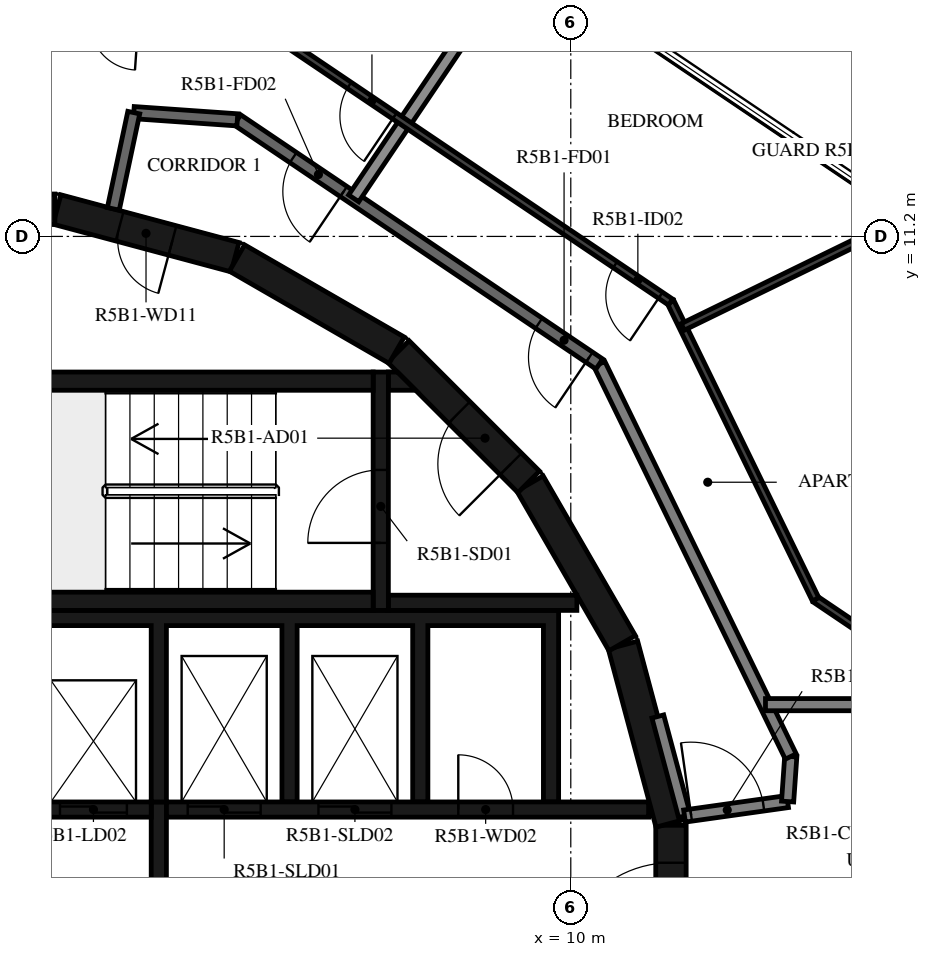
"""IFC4 building model, lengths in metres.
Left out: names, types, materials, properties, quantities, classifications, styles, units other than length and angle.
Written with IfcOpenShell. Run it as: python <this file> out.ifc"""

import sys

from ifc_helpers import new_model, si_unit, direction, frame, frame_2d, origin, place, context, subcontext, project, spatial, polyline, rectangle, outline, extrude, element, fill, save


model = new_model("IFC4")
c1 = context("Model", 3, precision=1e-05, world=origin(), true_north=direction((0.0, 1.0)))
c2 = subcontext(c1, "Body", "Model", "MODEL_VIEW")
j1 = project(units=[si_unit("LENGTHUNIT", "METRE"), si_unit("PLANEANGLEUNIT", "RADIAN")], contexts=[c1])
p1 = place(None, origin())
s1 = spatial("IfcSite", under=j1, at=p1, CompositionType="ELEMENT")
p2 = place(p1, origin())
s2 = spatial("IfcBuilding", under=s1, at=p2, CompositionType="ELEMENT")
p3 = place(p2, frame((0.0, 0.0, 198.9)))
s3 = spatial("IfcBuildingStorey", under=s2, at=p3, CompositionType="ELEMENT", Elevation=198.9)
p4 = place(p3, frame((11.647, -1.516, 0.0), z_axis=(0.0, 0.0, 1.0), x_axis=(0.0, 1.0, 0.0)))
e1 = element("IfcWall", 1, at=p4, inside=s3, PredefinedType="SHEAR", context=c2, shape_type="SweptSolid", body=[
    extrude(rectangle(XDim=3.033, YDim=0.5, at=frame_2d((1.516, 0.0))), origin(), (0.0, 0.0, 1.0), 3.12),
])
p5 = place(p4, frame((0.616, 0.0, 0.0)))
e2 = element("IfcOpeningElement", 2, at=p5, cuts=e1, PredefinedType="OPENING", context=c2, shape_type="SweptSolid", body=[
    extrude(rectangle(XDim=1.8, YDim=2.1, at=frame_2d((0.9, 1.05))), frame((0.0, 0.26, 0.0), z_axis=(0.0, -1.0, 0.0), x_axis=(1.0, 0.0, 0.0)), (0.0, 0.0, 1.0), 0.52),
])
for number, where, z_axis, x_axis in (
    (3, (11.643, 1.55, 0.0), (0.0, 0.0, 1.0), (-0.259, 0.966, 0.0)),
    (4, (10.845, 4.51, 0.0), (0.0, 0.0, 1.0), (-0.5, 0.866, 0.0)),
):
    element("IfcWall", number, at=place(p3, frame(where, z_axis=z_axis, x_axis=x_axis)), inside=s3, PredefinedType="SHEAR", context=c2, shape_type="SweptSolid", body=[
        extrude(rectangle(XDim=3.033, YDim=0.5, at=frame_2d((1.516, 0.0))), origin(), (0.0, 0.0, 1.0), 3.12),
    ])
p6 = place(p3, frame((9.308, 7.164, 0.0), z_axis=(0.0, 0.0, 1.0), x_axis=(-0.707106781187, 0.707106781187, 0.0)))
e5 = element("IfcWall", 5, at=p6, inside=s3, PredefinedType="SHEAR", context=c2, shape_type="SweptSolid", body=[
    extrude(rectangle(XDim=3.032, YDim=0.5, at=frame_2d((1.516, 0.0))), origin(), (0.0, 0.0, 1.0), 3.12),
])
p7 = place(p6, frame((0.416, 0.0, 0.0)))
e6 = element("IfcOpeningElement", 6, at=p7, cuts=e5, PredefinedType="OPENING", context=c2, shape_type="SweptSolid", body=[
    extrude(rectangle(XDim=1.2, YDim=2.1, at=frame_2d((0.6, 1.05))), frame((0.0, 0.26, 0.0), z_axis=(0.0, -1.0, 0.0), x_axis=(1.0, 0.0, 0.0)), (0.0, 0.0, 1.0), 0.52),
])
p8 = place(p3, frame((7.137, 9.329, 0.0), z_axis=(0.0, 0.0, 1.0), x_axis=(-0.865975092491, 0.500087131594, 0.0)))
e7 = element("IfcWall", 7, at=p8, inside=s3, PredefinedType="SHEAR", context=c2, shape_type="SweptSolid", body=[
    extrude(rectangle(XDim=3.033, YDim=0.5, at=frame_2d((1.516, 0.0))), origin(), (0.0, 0.0, 1.0), 3.12),
])
p9 = place(p3, frame((4.479, 10.858, 0.0), z_axis=(0.0, 0.0, 1.0), x_axis=(-0.965948410781, 0.258734743916, 0.0)))
e8 = element("IfcWall", 8, at=p9, inside=s3, PredefinedType="SHEAR", context=c2, shape_type="SweptSolid", body=[
    extrude(rectangle(XDim=3.033, YDim=0.5, at=frame_2d((1.516, 0.0))), origin(), (0.0, 0.0, 1.0), 3.12),
])
p10 = place(p9, frame((1.066, 0.0, 0.0)))
e9 = element("IfcOpeningElement", 9, at=p10, cuts=e8, PredefinedType="OPENING", context=c2, shape_type="SweptSolid", body=[
    extrude(rectangle(XDim=0.9, YDim=2.1, at=frame_2d((0.45, 1.05))), frame((0.0, 0.26, 0.0), z_axis=(0.0, -1.0, 0.0), x_axis=(1.0, 0.0, 0.0)), (0.0, 0.0, 1.0), 0.52),
])
p11 = place(p3, frame((1.516, 11.647, 0.0), z_axis=(0.0, 0.0, 1.0), x_axis=(-1.0, 0.0, 0.0)))
e10 = element("IfcWall", 10, at=p11, inside=s3, PredefinedType="SHEAR", context=c2, shape_type="SweptSolid", body=[
    extrude(rectangle(XDim=3.033, YDim=0.5, at=frame_2d((1.516, 0.0))), origin(), (0.0, 0.0, 1.0), 3.12),
])
for number, where, z_axis, x_axis in (
    (11, (0.0, 5.2, 0.0), (0.0, 0.0, 1.0), (1.0, 0.0, 0.0)),
    (12, (0.0, 8.82, 0.0), (0.0, 0.0, 1.0), (1.0, 0.0, 0.0)),
):
    element("IfcWall", number, at=place(p3, frame(where, z_axis=z_axis, x_axis=x_axis)), inside=s3, PredefinedType="SHEAR", context=c2, shape_type="SweptSolid", body=[
        extrude(rectangle(XDim=6.75, YDim=0.3, at=frame_2d((3.375, 0.0))), origin(), (0.0, 0.0, 1.0), 3.12),
    ])
p12 = place(p3, frame((6.875, 5.05, 0.0), z_axis=(0.0, 0.0, 1.0), x_axis=(0.0, 1.0, 0.0)))
e13 = element("IfcWall", 13, at=p12, inside=s3, PredefinedType="SHEAR", context=c2, shape_type="SweptSolid", body=[
    extrude(rectangle(XDim=3.92, YDim=0.25, at=frame_2d((1.96, 0.0))), origin(), (0.0, 0.0, 1.0), 3.12),
])
p13 = place(p12, frame((1.11, 0.0, 0.0)))
e14 = element("IfcOpeningElement", 14, at=p13, cuts=e13, PredefinedType="OPENING", context=c2, shape_type="SweptSolid", body=[
    extrude(rectangle(XDim=1.2, YDim=2.1, at=frame_2d((0.6, 1.05))), frame((0.0, 0.135, 0.0), z_axis=(0.0, -1.0, 0.0), x_axis=(1.0, 0.0, 0.0)), (0.0, 0.0, 1.0), 0.27),
])
p14 = place(p3, frame((7.0, 5.175, 0.0), z_axis=(0.0, 0.0, 1.0), x_axis=(1.0, 0.0, 0.0)))
e15 = element("IfcWall", 15, at=p14, inside=s3, PredefinedType="SHEAR", context=c2, shape_type="SweptSolid", body=[
    extrude(rectangle(XDim=3.1, YDim=0.25, at=frame_2d((1.55, 0.0))), origin(), (0.0, 0.0, 1.0), 3.12),
])
p15 = place(p3, origin())
e16 = element("IfcWall", 16, at=p15, inside=s3, PredefinedType="SHEAR", context=c2, shape_type="SweptSolid", body=[
    extrude(outline(polyline([(7.448, 8.67), (7.0, 8.67), (7.0, 8.97), (7.148, 8.97), (7.448, 8.67)])), origin(), (0.0, 0.0, 1.0), 3.12),
])
p16 = place(p3, origin())
e17 = element("IfcWall", 17, at=p16, inside=s3, PredefinedType="SHEAR", context=c2, shape_type="SweptSolid", body=[
    extrude(outline(polyline([(-9.55, 4.8), (-1.2, 4.8), (-1.2, 1.9), (-0.95, 1.9), (-0.95, 4.8), (0.95, 4.8), (0.95, 1.9), (1.2, 1.9), (1.2, 4.8), (3.1, 4.8), (3.1, 1.9), (3.35, 1.9), (3.35, 4.8), (5.25, 4.8), (5.25, 1.9), (5.5, 1.9), (5.5, 4.8), (7.4, 4.8), (7.4, 1.9), (7.65, 1.9), (7.65, 4.8), (9.55, 4.8), (9.55, 1.9), (9.8, 1.9), (9.8, 4.8), (9.8, 5.05), (-9.8, 5.05), (-9.8, 4.8), (-9.8, 1.9), (-9.55, 1.9), (-9.55, 4.8)])), origin(), (0.0, 0.0, 1.0), 3.12),
])
p17 = place(p3, frame((-11.28, 1.775, 0.0), z_axis=(0.0, 0.0, 1.0), x_axis=(1.0, 0.0, 0.0)))
e18 = element("IfcWall", 18, at=p17, inside=s3, PredefinedType="SHEAR", context=c2, shape_type="SweptSolid", body=[
    extrude(rectangle(XDim=14.38, YDim=0.25, at=frame_2d((7.19, 0.0))), origin(), (0.0, 0.0, 1.0), 3.12),
])
p18 = place(p17, frame((10.73, 0.0, 0.0)))
e19 = element("IfcOpeningElement", 19, at=p18, cuts=e18, PredefinedType="OPENING", context=c2, shape_type="SweptSolid", body=[
    extrude(rectangle(XDim=1.1, YDim=2.1, at=frame_2d((0.55, 1.05))), frame((0.0, 0.135, 0.0), z_axis=(0.0, -1.0, 0.0), x_axis=(1.0, 0.0, 0.0)), (0.0, 0.0, 1.0), 0.27),
])
p19 = place(p17, frame((12.88, 0.0, 0.0)))
e20 = element("IfcOpeningElement", 20, at=p19, cuts=e18, PredefinedType="OPENING", context=c2, shape_type="SweptSolid", body=[
    extrude(rectangle(XDim=1.1, YDim=2.1, at=frame_2d((0.55, 1.05))), frame((0.0, 0.135, 0.0), z_axis=(0.0, -1.0, 0.0), x_axis=(1.0, 0.0, 0.0)), (0.0, 0.0, 1.0), 0.27),
])
p20 = place(p17, frame((5.455, 0.0, 0.0)))
e21 = element("IfcOpeningElement", 21, at=p20, cuts=e18, PredefinedType="OPENING", context=c2, shape_type="SweptSolid", body=[
    extrude(rectangle(XDim=0.9, YDim=2.1, at=frame_2d((0.45, 1.05))), frame((0.0, 0.135, 0.0), z_axis=(0.0, -1.0, 0.0), x_axis=(1.0, 0.0, 0.0)), (0.0, 0.0, 1.0), 0.27),
])
p21 = place(p3, frame((3.35, 1.775, 0.0), z_axis=(0.0, 0.0, 1.0), x_axis=(1.0, 0.0, 0.0)))
e22 = element("IfcWall", 22, at=p21, inside=s3, PredefinedType="SHEAR", context=c2, shape_type="SweptSolid", body=[
    extrude(rectangle(XDim=7.93, YDim=0.25, at=frame_2d((3.965, 0.0))), origin(), (0.0, 0.0, 1.0), 3.12),
])
p22 = place(p21, frame((0.35, 0.0, 0.0)))
e23 = element("IfcOpeningElement", 23, at=p22, cuts=e22, PredefinedType="OPENING", context=c2, shape_type="SweptSolid", body=[
    extrude(rectangle(XDim=1.2, YDim=2.4, at=frame_2d((0.6, 1.2))), frame((0.0, 0.135, 0.0), z_axis=(0.0, -1.0, 0.0), x_axis=(1.0, 0.0, 0.0)), (0.0, 0.0, 1.0), 0.27),
])
p23 = place(p21, frame((2.5, 0.0, 0.0)))
e24 = element("IfcOpeningElement", 24, at=p23, cuts=e22, PredefinedType="OPENING", context=c2, shape_type="SweptSolid", body=[
    extrude(rectangle(XDim=1.2, YDim=2.4, at=frame_2d((0.6, 1.2))), frame((0.0, 0.135, 0.0), z_axis=(0.0, -1.0, 0.0), x_axis=(1.0, 0.0, 0.0)), (0.0, 0.0, 1.0), 0.27),
])
p24 = place(p21, frame((4.8, 0.0, 0.0)))
e25 = element("IfcOpeningElement", 25, at=p24, cuts=e22, PredefinedType="OPENING", context=c2, shape_type="SweptSolid", body=[
    extrude(rectangle(XDim=0.9, YDim=2.1, at=frame_2d((0.45, 1.05))), frame((0.0, 0.135, 0.0), z_axis=(0.0, -1.0, 0.0), x_axis=(1.0, 0.0, 0.0)), (0.0, 0.0, 1.0), 0.27),
])
p25 = place(p3, frame((3.225, -1.9, 0.0), z_axis=(0.0, 0.0, 1.0), x_axis=(0.0, 1.0, 0.0)))
e26 = element("IfcWall", 26, at=p25, inside=s3, PredefinedType="SHEAR", context=c2, shape_type="SweptSolid", body=[
    extrude(rectangle(XDim=3.8, YDim=0.25, at=frame_2d((1.9, 0.0))), origin(), (0.0, 0.0, 1.0), 3.12),
])
p26 = place(p3, frame((11.87, 1.668, 0.0), z_axis=(0.0, 0.0, 1.0), x_axis=(-0.258836880648, 0.965921047093, 0.0)))
e27 = element("IfcWall", 27, at=p26, inside=s3, PredefinedType="STANDARD", context=c2, shape_type="SweptSolid", body=[
    extrude(rectangle(XDim=1.695, YDim=0.2, at=frame_2d((0.848, 0.0))), origin(), (0.0, 0.0, 1.0), 3.12),
])
p27 = place(p3, frame((11.87, 1.668, 0.0), z_axis=(0.0, 0.0, 1.0), x_axis=(0.990271931984, 0.139145609792, 0.0)))
e28 = element("IfcWall", 28, at=p27, inside=s3, PredefinedType="STANDARD", context=c2, shape_type="SweptSolid", body=[
    extrude(rectangle(XDim=1.712, YDim=0.2, at=frame_2d((0.856, 0.0))), origin(), (0.0, 0.0, 1.0), 3.12),
])
p28 = place(p27, frame((0.11, 0.0, 0.0)))
e29 = element("IfcOpeningElement", 29, at=p28, cuts=e28, PredefinedType="OPENING", context=c2, shape_type="SweptSolid", body=[
    extrude(rectangle(XDim=1.2, YDim=2.1, at=frame_2d((0.6, 1.05))), frame((0.0, 0.11, 0.0), z_axis=(0.0, -1.0, 0.0), x_axis=(1.0, 0.0, 0.0)), (0.0, 0.0, 1.0), 0.22),
])
p29 = place(p3, frame((13.566, 1.906, 0.0), z_axis=(0.0, 0.0, 1.0), x_axis=(0.07005495793, 0.997543133338, 0.0)))
e30 = element("IfcWall", 30, at=p29, inside=s3, PredefinedType="STANDARD", context=c2, shape_type="SweptSolid", body=[
    extrude(rectangle(XDim=0.742, YDim=0.2, at=frame_2d((0.371, 0.0))), origin(), (0.0, 0.0, 1.0), 3.12),
])
p30 = place(p3, frame((13.618, 2.647, 0.0), z_axis=(0.0, 0.0, 1.0), x_axis=(-0.438366026218, 0.898796543751, 0.0)))
e31 = element("IfcWall", 31, at=p30, inside=s3, PredefinedType="STANDARD", context=c2, shape_type="SweptSolid", body=[
    extrude(rectangle(XDim=7.181, YDim=0.2, at=frame_2d((3.591, 0.0))), origin(), (0.0, 0.0, 1.0), 3.12),
])
p31 = place(p3, frame((10.47, 9.101, 0.0), z_axis=(0.0, 0.0, 1.0), x_axis=(-0.829035841718, 0.559195469534, 0.0)))
e32 = element("IfcWall", 32, at=p31, inside=s3, PredefinedType="STANDARD", context=c2, shape_type="SweptSolid", body=[
    extrude(rectangle(XDim=7.181, YDim=0.2, at=frame_2d((3.591, 0.0))), origin(), (0.0, 0.0, 1.0), 3.12),
])
p32 = place(p31, frame((0.2, 0.0, 0.0)))
e33 = element("IfcOpeningElement", 33, at=p32, cuts=e32, PredefinedType="OPENING", context=c2, shape_type="SweptSolid", body=[
    extrude(rectangle(XDim=1.0, YDim=2.1, at=frame_2d((0.5, 1.05))), frame((0.0, 0.11, 0.0), z_axis=(0.0, -1.0, 0.0), x_axis=(1.0, 0.0, 0.0)), (0.0, 0.0, 1.0), 0.22),
])
p33 = place(p31, frame((5.073, 0.0, 0.0)))
e34 = element("IfcOpeningElement", 34, at=p33, cuts=e32, PredefinedType="OPENING", context=c2, shape_type="SweptSolid", body=[
    extrude(rectangle(XDim=1.0, YDim=2.1, at=frame_2d((0.5, 1.05))), frame((0.0, 0.11, 0.0), z_axis=(0.0, -1.0, 0.0), x_axis=(1.0, 0.0, 0.0)), (0.0, 0.0, 1.0), 0.22),
])
p34 = place(p3, frame((4.517, 13.117, 0.0), z_axis=(0.0, 0.0, 1.0), x_axis=(-0.997562153664, 0.069783591025, 0.0)))
e35 = element("IfcWall", 35, at=p34, inside=s3, PredefinedType="STANDARD", context=c2, shape_type="SweptSolid", body=[
    extrude(rectangle(XDim=1.707, YDim=0.2, at=frame_2d((0.854, 0.0))), origin(), (0.0, 0.0, 1.0), 3.12),
])
p35 = place(p3, frame((2.813, 13.236, 0.0), z_axis=(0.0, 0.0, 1.0), x_axis=(-0.207911086063, -0.978147729278, 0.0)))
e36 = element("IfcWall", 36, at=p35, inside=s3, PredefinedType="STANDARD", context=c2, shape_type="SweptSolid", body=[
    extrude(rectangle(XDim=1.618, YDim=0.2, at=frame_2d((0.809, 0.0))), origin(), (0.0, 0.0, 1.0), 3.12),
])
p36 = place(p3, frame((17.9, 3.5, 0.0), z_axis=(0.0, 0.0, 1.0), x_axis=(-1.0, 0.0, 0.0)))
e37 = element("IfcWall", 37, at=p36, inside=s3, PredefinedType="STANDARD", context=c2, shape_type="SweptSolid", body=[
    extrude(rectangle(XDim=4.698, YDim=0.2, at=frame_2d((2.349, 0.0))), origin(), (0.0, 0.0, 1.0), 3.12),
])
p37 = place(p3, frame((9.104, 15.79, 0.0), z_axis=(0.0, 0.0, 1.0), x_axis=(-0.559193912135, -0.829036892201, 0.0)))
e38 = element("IfcWall", 38, at=p37, inside=s3, PredefinedType="STANDARD", context=c2, shape_type="SweptSolid", body=[
    extrude(rectangle(XDim=4.781, YDim=0.2, at=frame_2d((2.39, 0.0))), origin(), (0.0, 0.0, 1.0), 2.73),
])
p38 = place(p3, frame((14.654, 4.808, 0.0), z_axis=(0.0, 0.0, 1.0), x_axis=(-0.829065184024, 0.559151965604, 0.0)))
e39 = element("IfcWall", 39, at=p38, inside=s3, PredefinedType="PARTITIONING", context=c2, shape_type="SweptSolid", body=[
    extrude(rectangle(XDim=0.758, YDim=0.12, at=frame_2d((0.379, 0.0))), origin(), (0.0, 0.0, 1.0), 3.12),
])
p39 = place(p3, frame((14.026, 5.232, 0.0), z_axis=(0.0, 0.0, 1.0), x_axis=(-0.438374985284, 0.89879217413, 0.0)))
e40 = element("IfcWall", 40, at=p39, inside=s3, PredefinedType="PARTITIONING", context=c2, shape_type="SweptSolid", body=[
    extrude(rectangle(XDim=5.438, YDim=0.12, at=frame_2d((2.719, 0.0))), origin(), (0.0, 0.0, 1.0), 3.12),
])
p40 = place(p3, frame((11.642, 10.12, 0.0), z_axis=(0.0, 0.0, 1.0), x_axis=(-0.829032241779, 0.55920080659, 0.0)))
e41 = element("IfcWall", 41, at=p40, inside=s3, PredefinedType="PARTITIONING", context=c2, shape_type="SweptSolid", body=[
    extrude(rectangle(XDim=7.985, YDim=0.12, at=frame_2d((3.992, 0.0))), origin(), (0.0, 0.0, 1.0), 3.12),
])
p41 = place(p40, frame((0.2, 0.0, 0.0)))
e42 = element("IfcOpeningElement", 42, at=p41, cuts=e41, PredefinedType="OPENING", context=c2, shape_type="SweptSolid", body=[
    extrude(rectangle(XDim=0.9, YDim=2.1, at=frame_2d((0.45, 1.05))), frame((0.0, 0.07, 0.0), z_axis=(0.0, -1.0, 0.0), x_axis=(1.0, 0.0, 0.0)), (0.0, 0.0, 1.0), 0.14),
])
p42 = place(p40, frame((5.475, 0.0, 0.0)))
e43 = element("IfcOpeningElement", 43, at=p42, cuts=e41, PredefinedType="OPENING", context=c2, shape_type="SweptSolid", body=[
    extrude(rectangle(XDim=0.9, YDim=2.1, at=frame_2d((0.45, 1.05))), frame((0.0, 0.07, 0.0), z_axis=(0.0, -1.0, 0.0), x_axis=(1.0, 0.0, 0.0)), (0.0, 0.0, 1.0), 0.14),
])
p43 = place(p3, frame((15.482, 11.487, 0.0), z_axis=(0.0, 0.0, 1.0), x_axis=(-0.898807251285, -0.438344071521, 0.0)))
e44 = element("IfcWall", 44, at=p43, inside=s3, PredefinedType="PARTITIONING", context=c2, shape_type="SweptSolid", body=[
    extrude(rectangle(XDim=4.051, YDim=0.12, at=frame_2d((2.025, 0.0))), origin(), (0.0, 0.0, 1.0), 3.12),
])
p44 = place(p13, origin())
e45 = element("IfcDoor", 45, at=p44, inside=s3, OperationType="SINGLE_SWING_LEFT", PredefinedType="DOOR", context=c2, shape_type="SweptSolid", body=[
    extrude(rectangle(XDim=1.2, YDim=2.1, at=frame_2d((0.6, 1.05))), frame((0.0, 0.025, 0.0), z_axis=(0.0, -1.0, 0.0), x_axis=(1.0, 0.0, 0.0)), (0.0, 0.0, 1.0), 0.05),
])
fill(e14, e45)
p45 = place(p7, origin())
e46 = element("IfcDoor", 46, at=p45, inside=s3, OperationType="SINGLE_SWING_RIGHT", PredefinedType="DOOR", context=c2, shape_type="SweptSolid", body=[
    extrude(rectangle(XDim=1.2, YDim=2.1, at=frame_2d((0.6, 1.05))), frame((0.0, 0.025, 0.0), z_axis=(0.0, -1.0, 0.0), x_axis=(1.0, 0.0, 0.0)), (0.0, 0.0, 1.0), 0.05),
])
fill(e6, e46)
p46 = place(p5, origin())
e47 = element("IfcDoor", 47, at=p46, inside=s3, OperationType="DOUBLE_DOOR_SINGLE_SWING", PredefinedType="DOOR", context=c2, shape_type="SweptSolid", body=[
    extrude(rectangle(XDim=1.8, YDim=2.1, at=frame_2d((0.9, 1.05))), frame((0.0, 0.025, 0.0), z_axis=(0.0, -1.0, 0.0), x_axis=(1.0, 0.0, 0.0)), (0.0, 0.0, 1.0), 0.05),
])
fill(e2, e47)
p47 = place(p19, origin())
e48 = element("IfcDoor", 48, at=p47, inside=s3, OperationType="DOUBLE_DOOR_SLIDING", PredefinedType="DOOR", context=c2, shape_type="SweptSolid", body=[
    extrude(rectangle(XDim=1.1, YDim=2.1, at=frame_2d((0.55, 1.05))), frame((0.0, 0.025, 0.0), z_axis=(0.0, -1.0, 0.0), x_axis=(1.0, 0.0, 0.0)), (0.0, 0.0, 1.0), 0.05),
])
fill(e20, e48)
p48 = place(p22, origin())
e49 = element("IfcDoor", 49, at=p48, inside=s3, OperationType="DOUBLE_DOOR_SLIDING", PredefinedType="DOOR", context=c2, shape_type="SweptSolid", body=[
    extrude(rectangle(XDim=1.2, YDim=2.4, at=frame_2d((0.6, 1.2))), frame((0.0, 0.025, 0.0), z_axis=(0.0, -1.0, 0.0), x_axis=(1.0, 0.0, 0.0)), (0.0, 0.0, 1.0), 0.05),
])
fill(e23, e49)
p49 = place(p23, origin())
e50 = element("IfcDoor", 50, at=p49, inside=s3, OperationType="DOUBLE_DOOR_SLIDING", PredefinedType="DOOR", context=c2, shape_type="SweptSolid", body=[
    extrude(rectangle(XDim=1.2, YDim=2.4, at=frame_2d((0.6, 1.2))), frame((0.0, 0.025, 0.0), z_axis=(0.0, -1.0, 0.0), x_axis=(1.0, 0.0, 0.0)), (0.0, 0.0, 1.0), 0.05),
])
fill(e24, e50)
p50 = place(p24, origin())
e51 = element("IfcDoor", 51, at=p50, inside=s3, OperationType="SINGLE_SWING_RIGHT", PredefinedType="DOOR", context=c2, shape_type="SweptSolid", body=[
    extrude(rectangle(XDim=0.9, YDim=2.1, at=frame_2d((0.45, 1.05))), frame((0.0, 0.025, 0.0), z_axis=(0.0, -1.0, 0.0), x_axis=(1.0, 0.0, 0.0)), (0.0, 0.0, 1.0), 0.05),
])
fill(e25, e51)
p51 = place(p10, origin())
e52 = element("IfcDoor", 52, at=p51, inside=s3, OperationType="SINGLE_SWING_LEFT", PredefinedType="DOOR", context=c2, shape_type="SweptSolid", body=[
    extrude(rectangle(XDim=0.9, YDim=2.1, at=frame_2d((0.45, 1.05))), frame((0.0, 0.025, 0.0), z_axis=(0.0, -1.0, 0.0), x_axis=(1.0, 0.0, 0.0)), (0.0, 0.0, 1.0), 0.05),
])
fill(e9, e52)
p52 = place(p32, origin())
e53 = element("IfcDoor", 53, at=p52, inside=s3, OperationType="SINGLE_SWING_LEFT", PredefinedType="DOOR", context=c2, shape_type="SweptSolid", body=[
    extrude(rectangle(XDim=1.0, YDim=2.1, at=frame_2d((0.5, 1.05))), frame((0.0, 0.025, 0.0), z_axis=(0.0, -1.0, 0.0), x_axis=(1.0, 0.0, 0.0)), (0.0, 0.0, 1.0), 0.05),
])
fill(e33, e53)
p53 = place(p41, origin())
e54 = element("IfcDoor", 54, at=p53, inside=s3, OperationType="SINGLE_SWING_LEFT", PredefinedType="DOOR", context=c2, shape_type="SweptSolid", body=[
    extrude(rectangle(XDim=0.9, YDim=2.1, at=frame_2d((0.45, 1.05))), frame((0.0, 0.025, 0.0), z_axis=(0.0, -1.0, 0.0), x_axis=(1.0, 0.0, 0.0)), (0.0, 0.0, 1.0), 0.05),
])
fill(e42, e54)
p54 = place(p33, origin())
e55 = element("IfcDoor", 55, at=p54, inside=s3, OperationType="SINGLE_SWING_RIGHT", PredefinedType="DOOR", context=c2, shape_type="SweptSolid", body=[
    extrude(rectangle(XDim=1.0, YDim=2.1, at=frame_2d((0.5, 1.05))), frame((0.0, 0.025, 0.0), z_axis=(0.0, -1.0, 0.0), x_axis=(1.0, 0.0, 0.0)), (0.0, 0.0, 1.0), 0.05),
])
fill(e34, e55)
p55 = place(p42, origin())
e56 = element("IfcDoor", 56, at=p55, inside=s3, OperationType="SINGLE_SWING_RIGHT", PredefinedType="DOOR", context=c2, shape_type="SweptSolid", body=[
    extrude(rectangle(XDim=0.9, YDim=2.1, at=frame_2d((0.45, 1.05))), frame((0.0, 0.025, 0.0), z_axis=(0.0, -1.0, 0.0), x_axis=(1.0, 0.0, 0.0)), (0.0, 0.0, 1.0), 0.05),
])
fill(e43, e56)
p56 = place(p28, origin())
e57 = element("IfcDoor", 57, at=p56, inside=s3, OperationType="DOUBLE_DOOR_SINGLE_SWING", PredefinedType="DOOR", context=c2, shape_type="SweptSolid", body=[
    extrude(rectangle(XDim=1.2, YDim=2.1, at=frame_2d((0.6, 1.05))), frame((0.0, 0.025, 0.0), z_axis=(0.0, -1.0, 0.0), x_axis=(1.0, 0.0, 0.0)), (0.0, 0.0, 1.0), 0.05),
])
fill(e29, e57)
save(model, sys.argv[1])
